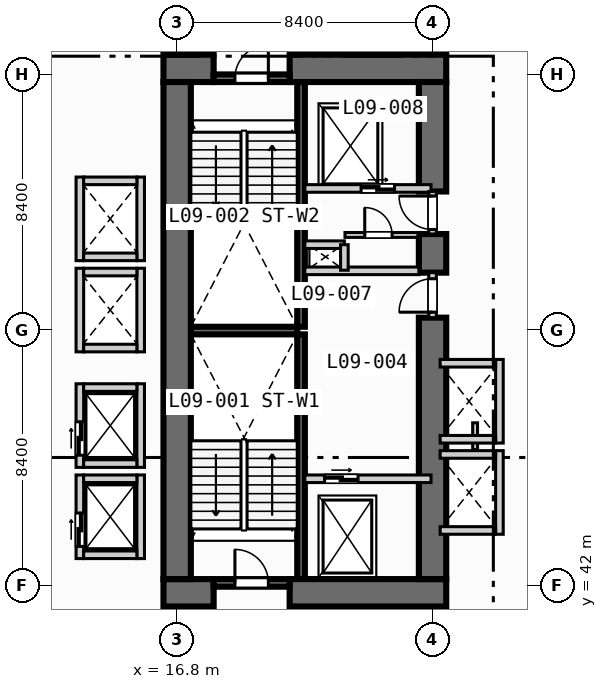
"""IFC4 building model, lengths in metres.
Left out: names, types, materials, properties, quantities, classifications, styles, units other than length and angle.
Written with IfcOpenShell. Run it as: python <this file> out.ifc"""

import sys

from ifc_helpers import new_model, si_unit, direction, frame, frame_2d, origin, place, context, subcontext, project, spatial, rectangle, extrude, element, fill, save


model = new_model("IFC4")
c1 = context("Model", 3, precision=1e-05, world=origin(), true_north=direction((0.0, 1.0)))
c2 = subcontext(c1, "Body", "Model", "MODEL_VIEW")
j1 = project(units=[si_unit("LENGTHUNIT", "METRE"), si_unit("PLANEANGLEUNIT", "RADIAN")], contexts=[c1])
p1 = place(None, origin())
s1 = spatial("IfcSite", under=j1, at=p1, CompositionType="ELEMENT")
p2 = place(p1, origin())
s2 = spatial("IfcBuilding", under=s1, at=p2, CompositionType="ELEMENT")
p3 = place(p2, frame((0.0, 0.0, 43.4)))
s3 = spatial("IfcBuildingStorey", under=s2, at=p3, CompositionType="ELEMENT", Elevation=43.4)
for number, where, z_axis, x_axis in (
    (1, (20.875, 42.2, 0.0), (0.0, 0.0, 1.0), (0.0, 1.0, 0.0)),
    (2, (20.875, 50.5, 0.0), (0.0, 0.0, 1.0), (0.0, 1.0, 0.0)),
):
    element("IfcWall", number, at=place(p3, frame(where, z_axis=z_axis, x_axis=x_axis)), inside=s3, PredefinedType="SOLIDWALL", context=c2, shape_type="SweptSolid", body=[
        extrude(rectangle(XDim=8.05, YDim=0.25, at=frame_2d((4.025, 0.0))), origin(), (0.0, 0.0, 1.0), 3.55),
    ])
p4 = place(p3, frame((17.25, 50.375, 0.0), z_axis=(0.0, 0.0, 1.0), x_axis=(1.0, 0.0, 0.0)))
e3 = element("IfcWall", 3, at=p4, inside=s3, PredefinedType="SOLIDWALL", context=c2, shape_type="SweptSolid", body=[
    extrude(rectangle(XDim=3.5, YDim=0.25, at=frame_2d((1.75, 0.0))), origin(), (0.0, 0.0, 1.0), 3.55),
])
p5 = place(p3, frame((16.35, 41.75, 0.0), z_axis=(0.0, 0.0, 1.0), x_axis=(1.0, 0.0, 0.0)))
e4 = element("IfcWall", 4, at=p5, inside=s3, PredefinedType="SHEAR", context=c2, shape_type="SweptSolid", body=[
    extrude(rectangle(XDim=1.65, YDim=0.9, at=frame_2d((0.825, 0.0))), origin(), (0.0, 0.0, 1.0), 3.55),
])
p6 = place(p3, frame((20.5, 41.75, 0.0), z_axis=(0.0, 0.0, 1.0), x_axis=(1.0, 0.0, 0.0)))
e5 = element("IfcWall", 5, at=p6, inside=s3, PredefinedType="SHEAR", context=c2, shape_type="SweptSolid", body=[
    extrude(rectangle(XDim=5.15, YDim=0.9, at=frame_2d((2.575, 0.0))), origin(), (0.0, 0.0, 1.0), 3.55),
])
p7 = place(p3, frame((16.35, 59.0, 0.0), z_axis=(0.0, 0.0, 1.0), x_axis=(1.0, 0.0, 0.0)))
e6 = element("IfcWall", 6, at=p7, inside=s3, PredefinedType="SHEAR", context=c2, shape_type="SweptSolid", body=[
    extrude(rectangle(XDim=1.65, YDim=0.9, at=frame_2d((0.825, 0.0))), origin(), (0.0, 0.0, 1.0), 3.55),
])
p8 = place(p3, frame((20.5, 59.0, 0.0), z_axis=(0.0, 0.0, 1.0), x_axis=(1.0, 0.0, 0.0)))
e7 = element("IfcWall", 7, at=p8, inside=s3, PredefinedType="SHEAR", context=c2, shape_type="SweptSolid", body=[
    extrude(rectangle(XDim=5.15, YDim=0.9, at=frame_2d((2.575, 0.0))), origin(), (0.0, 0.0, 1.0), 3.55),
])
p9 = place(p3, frame((16.8, 42.2, 0.0), z_axis=(0.0, 0.0, 1.0), x_axis=(0.0, 1.0, 0.0)))
e8 = element("IfcWall", 8, at=p9, inside=s3, PredefinedType="SHEAR", context=c2, shape_type="SweptSolid", body=[
    extrude(rectangle(XDim=16.35, YDim=0.9, at=frame_2d((8.175, 0.0))), origin(), (0.0, 0.0, 1.0), 3.55),
])
p10 = place(p3, frame((25.2, 42.2, 0.0), z_axis=(0.0, 0.0, 1.0), x_axis=(0.0, 1.0, 0.0)))
e9 = element("IfcWall", 9, at=p10, inside=s3, PredefinedType="SHEAR", context=c2, shape_type="SweptSolid", body=[
    extrude(rectangle(XDim=8.6, YDim=0.9, at=frame_2d((4.3, 0.0))), origin(), (0.0, 0.0, 1.0), 3.55),
])
p11 = place(p3, frame((25.2, 52.28, 0.0), z_axis=(0.0, 0.0, 1.0), x_axis=(0.0, 1.0, 0.0)))
e10 = element("IfcWall", 10, at=p11, inside=s3, PredefinedType="SHEAR", context=c2, shape_type="SweptSolid", body=[
    extrude(rectangle(XDim=1.27, YDim=0.9, at=frame_2d((0.635, 0.0))), origin(), (0.0, 0.0, 1.0), 3.55),
])
p12 = place(p3, frame((25.2, 54.95, 0.0), z_axis=(0.0, 0.0, 1.0), x_axis=(0.0, 1.0, 0.0)))
e11 = element("IfcWall", 11, at=p12, inside=s3, PredefinedType="SHEAR", context=c2, shape_type="SweptSolid", body=[
    extrude(rectangle(XDim=3.6, YDim=0.9, at=frame_2d((1.8, 0.0))), origin(), (0.0, 0.0, 1.0), 3.55),
])
p13 = place(p3, frame((18.0, 42.075, 0.0), z_axis=(0.0, 0.0, 1.0), x_axis=(1.0, 0.0, 0.0)))
e12 = element("IfcWall", 12, at=p13, inside=s3, PredefinedType="SOLIDWALL", context=c2, shape_type="SweptSolid", body=[
    extrude(rectangle(XDim=2.5, YDim=0.25, at=frame_2d((1.25, 0.0))), origin(), (0.0, 0.0, 1.0), 3.55),
])
p14 = place(p13, frame((0.7, 0.0, 0.0)))
e13 = element("IfcOpeningElement", 13, at=p14, cuts=e12, PredefinedType="OPENING", context=c2, shape_type="SweptSolid", body=[
    extrude(rectangle(XDim=1.1, YDim=2.15, at=frame_2d((0.55, 1.075))), frame((0.0, 0.135, 0.0), z_axis=(0.0, -1.0, 0.0), x_axis=(1.0, 0.0, 0.0)), (0.0, 0.0, 1.0), 0.27),
])
p15 = place(p3, frame((18.0, 58.675, 0.0), z_axis=(0.0, 0.0, 1.0), x_axis=(1.0, 0.0, 0.0)))
e14 = element("IfcWall", 14, at=p15, inside=s3, PredefinedType="SOLIDWALL", context=c2, shape_type="SweptSolid", body=[
    extrude(rectangle(XDim=2.5, YDim=0.25, at=frame_2d((1.25, 0.0))), origin(), (0.0, 0.0, 1.0), 3.55),
])
p16 = place(p15, frame((0.7, 0.0, 0.0)))
e15 = element("IfcOpeningElement", 15, at=p16, cuts=e14, PredefinedType="OPENING", context=c2, shape_type="SweptSolid", body=[
    extrude(rectangle(XDim=1.1, YDim=2.15, at=frame_2d((0.55, 1.075))), frame((0.0, 0.135, 0.0), z_axis=(0.0, -1.0, 0.0), x_axis=(1.0, 0.0, 0.0)), (0.0, 0.0, 1.0), 0.27),
])
p17 = place(p3, frame((21.0, 45.5, 0.0), z_axis=(0.0, 0.0, 1.0), x_axis=(1.0, 0.0, 0.0)))
e16 = element("IfcWall", 16, at=p17, inside=s3, PredefinedType="SOLIDWALL", context=c2, shape_type="SweptSolid", body=[
    extrude(rectangle(XDim=4.15, YDim=0.25, at=frame_2d((2.075, 0.0))), origin(), (0.0, 0.0, 1.0), 3.55),
])
p18 = place(p17, frame((0.65, 0.0, 0.0)))
e17 = element("IfcOpeningElement", 17, at=p18, cuts=e16, PredefinedType="OPENING", context=c2, shape_type="SweptSolid", body=[
    extrude(rectangle(XDim=1.1, YDim=2.15, at=frame_2d((0.55, 1.075))), frame((0.0, 0.135, 0.0), z_axis=(0.0, -1.0, 0.0), x_axis=(1.0, 0.0, 0.0)), (0.0, 0.0, 1.0), 0.27),
])
p19 = place(p3, frame((25.2, 50.8, 0.0), z_axis=(0.0, 0.0, 1.0), x_axis=(0.0, 1.0, 0.0)))
e18 = element("IfcWall", 18, at=p19, inside=s3, PredefinedType="SOLIDWALL", context=c2, shape_type="SweptSolid", body=[
    extrude(rectangle(XDim=1.48, YDim=0.25, at=frame_2d((0.74, 0.0))), origin(), (0.0, 0.0, 1.0), 3.55),
])
p20 = place(p19, frame((0.18, 0.0, 0.0)))
e19 = element("IfcOpeningElement", 19, at=p20, cuts=e18, PredefinedType="OPENING", context=c2, shape_type="SweptSolid", body=[
    extrude(rectangle(XDim=1.1, YDim=2.15, at=frame_2d((0.55, 1.075))), frame((0.0, 0.135, 0.0), z_axis=(0.0, -1.0, 0.0), x_axis=(1.0, 0.0, 0.0)), (0.0, 0.0, 1.0), 0.27),
])
p21 = place(p3, frame((21.0, 52.34, 0.0), z_axis=(0.0, 0.0, 1.0), x_axis=(1.0, 0.0, 0.0)))
e20 = element("IfcWall", 20, at=p21, inside=s3, PredefinedType="SOLIDWALL", context=c2, shape_type="SweptSolid", body=[
    extrude(rectangle(XDim=3.75, YDim=0.25, at=frame_2d((1.875, 0.0))), origin(), (0.0, 0.0, 1.0), 3.55),
])
p22 = place(p3, frame((21.0, 55.05, 0.0), z_axis=(0.0, 0.0, 1.0), x_axis=(1.0, 0.0, 0.0)))
e21 = element("IfcWall", 21, at=p22, inside=s3, PredefinedType="SOLIDWALL", context=c2, shape_type="SweptSolid", body=[
    extrude(rectangle(XDim=4.15, YDim=0.25, at=frame_2d((2.075, 0.0))), origin(), (0.0, 0.0, 1.0), 3.55),
])
p23 = place(p22, frame((1.85, 0.0, 0.0)))
e22 = element("IfcOpeningElement", 22, at=p23, cuts=e21, PredefinedType="OPENING", context=c2, shape_type="SweptSolid", body=[
    extrude(rectangle(XDim=1.1, YDim=2.15, at=frame_2d((0.55, 1.075))), frame((0.0, 0.135, 0.0), z_axis=(0.0, -1.0, 0.0), x_axis=(1.0, 0.0, 0.0)), (0.0, 0.0, 1.0), 0.27),
])
p24 = place(p3, frame((25.2, 53.55, 0.0), z_axis=(0.0, 0.0, 1.0), x_axis=(0.0, 1.0, 0.0)))
e23 = element("IfcWall", 23, at=p24, inside=s3, PredefinedType="SOLIDWALL", context=c2, shape_type="SweptSolid", body=[
    extrude(rectangle(XDim=1.4, YDim=0.25, at=frame_2d((0.7, 0.0))), origin(), (0.0, 0.0, 1.0), 3.55),
])
p25 = place(p24, frame((0.15, 0.0, 0.0)))
e24 = element("IfcOpeningElement", 24, at=p25, cuts=e23, PredefinedType="OPENING", context=c2, shape_type="SweptSolid", body=[
    extrude(rectangle(XDim=1.1, YDim=2.15, at=frame_2d((0.55, 1.075))), frame((0.0, 0.135, 0.0), z_axis=(0.0, -1.0, 0.0), x_axis=(1.0, 0.0, 0.0)), (0.0, 0.0, 1.0), 0.27),
])
p26 = place(p3, frame((21.0, 53.2, 0.0), z_axis=(0.0, 0.0, 1.0), x_axis=(1.0, 0.0, 0.0)))
e25 = element("IfcWall", 25, at=p26, inside=s3, PredefinedType="SOLIDWALL", context=c2, shape_type="SweptSolid", body=[
    extrude(rectangle(XDim=1.3, YDim=0.25, at=frame_2d((0.65, 0.0))), origin(), (0.0, 0.0, 1.0), 3.55),
])
p27 = place(p3, frame((22.3, 52.36, 0.0), z_axis=(0.0, 0.0, 1.0), x_axis=(0.0, 1.0, 0.0)))
e26 = element("IfcWall", 26, at=p27, inside=s3, PredefinedType="SOLIDWALL", context=c2, shape_type="SweptSolid", body=[
    extrude(rectangle(XDim=0.84, YDim=0.25, at=frame_2d((0.42, 0.0))), origin(), (0.0, 0.0, 1.0), 3.55),
])
p28 = place(p3, frame((22.32, 53.52, 0.0), z_axis=(0.0, 0.0, 1.0), x_axis=(1.0, 0.0, 0.0)))
e27 = element("IfcWall", 27, at=p28, inside=s3, PredefinedType="PARTITIONING", context=c2, shape_type="SweptSolid", body=[
    extrude(rectangle(XDim=2.4, YDim=0.16, at=frame_2d((1.2, 0.0))), origin(), (0.0, 0.0, 1.0), 3.55),
])
p29 = place(p28, frame((0.65, 0.0, 0.0)))
e28 = element("IfcOpeningElement", 28, at=p29, cuts=e27, PredefinedType="OPENING", context=c2, shape_type="SweptSolid", body=[
    extrude(rectangle(XDim=0.9, YDim=2.1, at=frame_2d((0.45, 1.05))), frame((0.0, 0.09, 0.0), z_axis=(0.0, -1.0, 0.0), x_axis=(1.0, 0.0, 0.0)), (0.0, 0.0, 1.0), 0.18),
])
p30 = place(p3, frame((13.6, 42.875, 0.0), z_axis=(0.0, 0.0, 1.0), x_axis=(0.0, 1.0, 0.0)))
e29 = element("IfcWall", 29, at=p30, inside=s3, PredefinedType="SOLIDWALL", context=c2, shape_type="SweptSolid", body=[
    extrude(rectangle(XDim=2.75, YDim=0.25, at=frame_2d((1.375, 0.0))), origin(), (0.0, 0.0, 1.0), 3.55),
])
p31 = place(p30, frame((0.4, 0.0, 0.0)))
e30 = element("IfcOpeningElement", 30, at=p31, cuts=e29, PredefinedType="OPENING", context=c2, shape_type="SweptSolid", body=[
    extrude(rectangle(XDim=1.1, YDim=2.15, at=frame_2d((0.55, 1.075))), frame((0.0, 0.135, 0.0), z_axis=(0.0, -1.0, 0.0), x_axis=(1.0, 0.0, 0.0)), (0.0, 0.0, 1.0), 0.27),
])
p32 = place(p3, frame((15.6, 42.875, 0.0), z_axis=(0.0, 0.0, 1.0), x_axis=(0.0, 1.0, 0.0)))
e31 = element("IfcWall", 31, at=p32, inside=s3, PredefinedType="SOLIDWALL", context=c2, shape_type="SweptSolid", body=[
    extrude(rectangle(XDim=2.75, YDim=0.25, at=frame_2d((1.375, 0.0))), origin(), (0.0, 0.0, 1.0), 3.55),
])
for number, where, z_axis, x_axis in (
    (32, (13.725, 43.0, 0.0), (0.0, 0.0, 1.0), (1.0, 0.0, 0.0)),
    (33, (13.725, 45.5, 0.0), (0.0, 0.0, 1.0), (1.0, 0.0, 0.0)),
):
    element("IfcWall", number, at=place(p3, frame(where, z_axis=z_axis, x_axis=x_axis)), inside=s3, PredefinedType="SOLIDWALL", context=c2, shape_type="SweptSolid", body=[
        extrude(rectangle(XDim=1.75, YDim=0.25, at=frame_2d((0.875, 0.0))), origin(), (0.0, 0.0, 1.0), 3.55),
    ])
p33 = place(p3, frame((13.6, 45.875, 0.0), z_axis=(0.0, 0.0, 1.0), x_axis=(0.0, 1.0, 0.0)))
e34 = element("IfcWall", 34, at=p33, inside=s3, PredefinedType="SOLIDWALL", context=c2, shape_type="SweptSolid", body=[
    extrude(rectangle(XDim=2.75, YDim=0.25, at=frame_2d((1.375, 0.0))), origin(), (0.0, 0.0, 1.0), 3.55),
])
p34 = place(p33, frame((0.4, 0.0, 0.0)))
e35 = element("IfcOpeningElement", 35, at=p34, cuts=e34, PredefinedType="OPENING", context=c2, shape_type="SweptSolid", body=[
    extrude(rectangle(XDim=1.1, YDim=2.15, at=frame_2d((0.55, 1.075))), frame((0.0, 0.135, 0.0), z_axis=(0.0, -1.0, 0.0), x_axis=(1.0, 0.0, 0.0)), (0.0, 0.0, 1.0), 0.27),
])
p35 = place(p3, frame((15.6, 45.875, 0.0), z_axis=(0.0, 0.0, 1.0), x_axis=(0.0, 1.0, 0.0)))
e36 = element("IfcWall", 36, at=p35, inside=s3, PredefinedType="SOLIDWALL", context=c2, shape_type="SweptSolid", body=[
    extrude(rectangle(XDim=2.75, YDim=0.25, at=frame_2d((1.375, 0.0))), origin(), (0.0, 0.0, 1.0), 3.55),
])
for number, where, z_axis, x_axis in (
    (37, (13.725, 46.0, 0.0), (0.0, 0.0, 1.0), (1.0, 0.0, 0.0)),
    (38, (13.725, 48.5, 0.0), (0.0, 0.0, 1.0), (1.0, 0.0, 0.0)),
):
    element("IfcWall", number, at=place(p3, frame(where, z_axis=z_axis, x_axis=x_axis)), inside=s3, PredefinedType="SOLIDWALL", context=c2, shape_type="SweptSolid", body=[
        extrude(rectangle(XDim=1.75, YDim=0.25, at=frame_2d((0.875, 0.0))), origin(), (0.0, 0.0, 1.0), 3.55),
    ])
for number, where, z_axis, x_axis in (
    (39, (13.6, 49.675, 0.0), (0.0, 0.0, 1.0), (0.0, 1.0, 0.0)),
    (40, (15.6, 49.675, 0.0), (0.0, 0.0, 1.0), (0.0, 1.0, 0.0)),
):
    element("IfcWall", number, at=place(p3, frame(where, z_axis=z_axis, x_axis=x_axis)), inside=s3, PredefinedType="SOLIDWALL", context=c2, shape_type="SweptSolid", body=[
        extrude(rectangle(XDim=2.75, YDim=0.25, at=frame_2d((1.375, 0.0))), origin(), (0.0, 0.0, 1.0), 3.55),
    ])
for number, where, z_axis, x_axis in (
    (41, (13.725, 49.8, 0.0), (0.0, 0.0, 1.0), (1.0, 0.0, 0.0)),
    (42, (13.725, 52.3, 0.0), (0.0, 0.0, 1.0), (1.0, 0.0, 0.0)),
):
    element("IfcWall", number, at=place(p3, frame(where, z_axis=z_axis, x_axis=x_axis)), inside=s3, PredefinedType="SOLIDWALL", context=c2, shape_type="SweptSolid", body=[
        extrude(rectangle(XDim=1.75, YDim=0.25, at=frame_2d((0.875, 0.0))), origin(), (0.0, 0.0, 1.0), 3.55),
    ])
for number, where, z_axis, x_axis in (
    (43, (13.6, 52.675, 0.0), (0.0, 0.0, 1.0), (0.0, 1.0, 0.0)),
    (44, (15.6, 52.675, 0.0), (0.0, 0.0, 1.0), (0.0, 1.0, 0.0)),
):
    element("IfcWall", number, at=place(p3, frame(where, z_axis=z_axis, x_axis=x_axis)), inside=s3, PredefinedType="SOLIDWALL", context=c2, shape_type="SweptSolid", body=[
        extrude(rectangle(XDim=2.75, YDim=0.25, at=frame_2d((1.375, 0.0))), origin(), (0.0, 0.0, 1.0), 3.55),
    ])
for number, where, z_axis, x_axis in (
    (45, (13.725, 52.8, 0.0), (0.0, 0.0, 1.0), (1.0, 0.0, 0.0)),
    (46, (13.725, 55.3, 0.0), (0.0, 0.0, 1.0), (1.0, 0.0, 0.0)),
):
    element("IfcWall", number, at=place(p3, frame(where, z_axis=z_axis, x_axis=x_axis)), inside=s3, PredefinedType="SOLIDWALL", context=c2, shape_type="SweptSolid", body=[
        extrude(rectangle(XDim=1.75, YDim=0.25, at=frame_2d((0.875, 0.0))), origin(), (0.0, 0.0, 1.0), 3.55),
    ])
p36 = place(p3, frame((27.4, 43.675, 0.0), z_axis=(0.0, 0.0, 1.0), x_axis=(0.0, 1.0, 0.0)))
e47 = element("IfcWall", 47, at=p36, inside=s3, PredefinedType="SOLIDWALL", context=c2, shape_type="SweptSolid", body=[
    extrude(rectangle(XDim=2.75, YDim=0.25, at=frame_2d((1.375, 0.0))), origin(), (0.0, 0.0, 1.0), 3.55),
])
for number, where, z_axis, x_axis in (
    (48, (25.45, 43.8, 0.0), (0.0, 0.0, 1.0), (1.0, 0.0, 0.0)),
    (49, (25.45, 46.3, 0.0), (0.0, 0.0, 1.0), (1.0, 0.0, 0.0)),
):
    element("IfcWall", number, at=place(p3, frame(where, z_axis=z_axis, x_axis=x_axis)), inside=s3, PredefinedType="SOLIDWALL", context=c2, shape_type="SweptSolid", body=[
        extrude(rectangle(XDim=1.825, YDim=0.25, at=frame_2d((0.913, 0.0))), origin(), (0.0, 0.0, 1.0), 3.55),
    ])
p37 = place(p3, frame((26.6, 46.46, 0.0), z_axis=(0.0, 0.0, 1.0), x_axis=(0.0, 1.0, 0.0)))
e50 = element("IfcWall", 50, at=p37, inside=s3, PredefinedType="PARTITIONING", context=c2, shape_type="SweptSolid", body=[
    extrude(rectangle(XDim=0.88, YDim=0.16, at=frame_2d((0.44, 0.0))), origin(), (0.0, 0.0, 1.0), 3.55),
])
p38 = place(p3, frame((27.4, 46.675, 0.0), z_axis=(0.0, 0.0, 1.0), x_axis=(0.0, 1.0, 0.0)))
e51 = element("IfcWall", 51, at=p38, inside=s3, PredefinedType="SOLIDWALL", context=c2, shape_type="SweptSolid", body=[
    extrude(rectangle(XDim=2.75, YDim=0.25, at=frame_2d((1.375, 0.0))), origin(), (0.0, 0.0, 1.0), 3.55),
])
for number, where, z_axis, x_axis in (
    (52, (25.45, 46.8, 0.0), (0.0, 0.0, 1.0), (1.0, 0.0, 0.0)),
    (53, (25.45, 49.3, 0.0), (0.0, 0.0, 1.0), (1.0, 0.0, 0.0)),
):
    element("IfcWall", number, at=place(p3, frame(where, z_axis=z_axis, x_axis=x_axis)), inside=s3, PredefinedType="SOLIDWALL", context=c2, shape_type="SweptSolid", body=[
        extrude(rectangle(XDim=1.825, YDim=0.25, at=frame_2d((0.913, 0.0))), origin(), (0.0, 0.0, 1.0), 3.55),
    ])
p39 = place(p14, origin())
e54 = element("IfcDoor", 54, at=p39, inside=s3, OperationType="SINGLE_SWING_LEFT", PredefinedType="DOOR", context=c2, shape_type="SweptSolid", body=[
    extrude(rectangle(XDim=1.1, YDim=2.15, at=frame_2d((0.55, 1.075))), frame((0.0, 0.025, 0.0), z_axis=(0.0, -1.0, 0.0), x_axis=(1.0, 0.0, 0.0)), (0.0, 0.0, 1.0), 0.05),
])
fill(e13, e54)
p40 = place(p16, origin())
e55 = element("IfcDoor", 55, at=p40, inside=s3, OperationType="SINGLE_SWING_RIGHT", PredefinedType="DOOR", context=c2, shape_type="SweptSolid", body=[
    extrude(rectangle(XDim=1.1, YDim=2.15, at=frame_2d((0.55, 1.075))), frame((0.0, 0.025, 0.0), z_axis=(0.0, -1.0, 0.0), x_axis=(1.0, 0.0, 0.0)), (0.0, 0.0, 1.0), 0.05),
])
fill(e15, e55)
p41 = place(p18, origin())
e56 = element("IfcDoor", 56, at=p41, inside=s3, OperationType="SLIDING_TO_LEFT", PredefinedType="DOOR", context=c2, shape_type="SweptSolid", body=[
    extrude(rectangle(XDim=1.1, YDim=2.15, at=frame_2d((0.55, 1.075))), frame((0.0, 0.025, 0.0), z_axis=(0.0, -1.0, 0.0), x_axis=(1.0, 0.0, 0.0)), (0.0, 0.0, 1.0), 0.05),
])
fill(e17, e56)
p42 = place(p20, origin())
e57 = element("IfcDoor", 57, at=p42, inside=s3, OperationType="SINGLE_SWING_LEFT", PredefinedType="DOOR", context=c2, shape_type="SweptSolid", body=[
    extrude(rectangle(XDim=1.1, YDim=2.15, at=frame_2d((0.55, 1.075))), frame((0.0, 0.025, 0.0), z_axis=(0.0, -1.0, 0.0), x_axis=(1.0, 0.0, 0.0)), (0.0, 0.0, 1.0), 0.05),
])
fill(e19, e57)
p43 = place(p23, origin())
e58 = element("IfcDoor", 58, at=p43, inside=s3, OperationType="SLIDING_TO_LEFT", PredefinedType="DOOR", context=c2, shape_type="SweptSolid", body=[
    extrude(rectangle(XDim=1.1, YDim=2.15, at=frame_2d((0.55, 1.075))), frame((0.0, 0.025, 0.0), z_axis=(0.0, -1.0, 0.0), x_axis=(1.0, 0.0, 0.0)), (0.0, 0.0, 1.0), 0.05),
])
fill(e22, e58)
p44 = place(p25, origin())
e59 = element("IfcDoor", 59, at=p44, inside=s3, OperationType="SINGLE_SWING_RIGHT", PredefinedType="DOOR", context=c2, shape_type="SweptSolid", body=[
    extrude(rectangle(XDim=1.1, YDim=2.15, at=frame_2d((0.55, 1.075))), frame((0.0, 0.025, 0.0), z_axis=(0.0, -1.0, 0.0), x_axis=(1.0, 0.0, 0.0)), (0.0, 0.0, 1.0), 0.05),
])
fill(e24, e59)
p45 = place(p29, origin())
e60 = element("IfcDoor", 60, at=p45, inside=s3, OperationType="SINGLE_SWING_LEFT", PredefinedType="DOOR", context=c2, shape_type="SweptSolid", body=[
    extrude(rectangle(XDim=0.9, YDim=2.1, at=frame_2d((0.45, 1.05))), frame((0.0, 0.025, 0.0), z_axis=(0.0, -1.0, 0.0), x_axis=(1.0, 0.0, 0.0)), (0.0, 0.0, 1.0), 0.05),
])
fill(e28, e60)
p46 = place(p31, origin())
e61 = element("IfcDoor", 61, at=p46, inside=s3, OperationType="SLIDING_TO_LEFT", PredefinedType="DOOR", context=c2, shape_type="SweptSolid", body=[
    extrude(rectangle(XDim=1.1, YDim=2.15, at=frame_2d((0.55, 1.075))), frame((0.0, 0.025, 0.0), z_axis=(0.0, -1.0, 0.0), x_axis=(1.0, 0.0, 0.0)), (0.0, 0.0, 1.0), 0.05),
])
fill(e30, e61)
p47 = place(p34, origin())
e62 = element("IfcDoor", 62, at=p47, inside=s3, OperationType="SLIDING_TO_LEFT", PredefinedType="DOOR", context=c2, shape_type="SweptSolid", body=[
    extrude(rectangle(XDim=1.1, YDim=2.15, at=frame_2d((0.55, 1.075))), frame((0.0, 0.025, 0.0), z_axis=(0.0, -1.0, 0.0), x_axis=(1.0, 0.0, 0.0)), (0.0, 0.0, 1.0), 0.05),
])
fill(e35, e62)
save(model, sys.argv[1])
